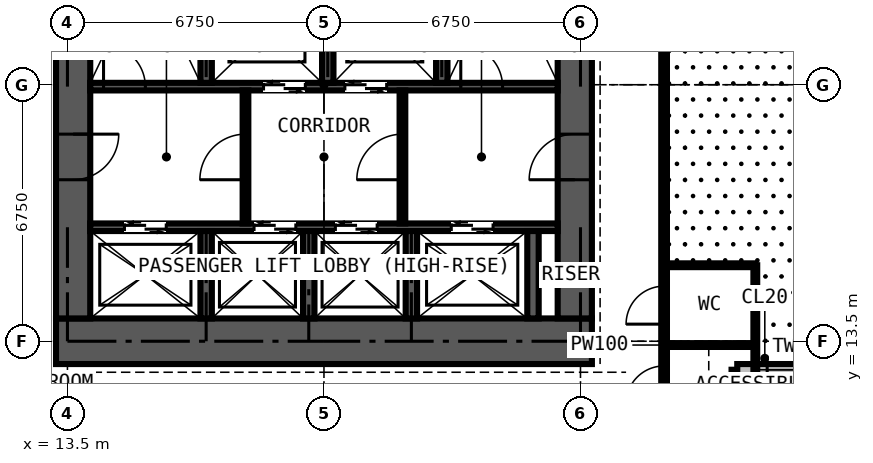
"""IFC4 building model, lengths in metres.
Left out: names, types, materials, properties, quantities, classifications, styles, units other than length and angle.
Written with IfcOpenShell. Run it as: python <this file> out.ifc"""

import sys

from ifc_helpers import new_model, si_unit, direction, frame, frame_2d, origin, place, context, subcontext, project, spatial, rectangle, extrude, element, fill, save


model = new_model("IFC4")
c1 = context("Model", 3, precision=1e-05, world=origin(), true_north=direction((0.0, 1.0)))
c2 = subcontext(c1, "Body", "Model", "MODEL_VIEW")
j1 = project(units=[si_unit("LENGTHUNIT", "METRE"), si_unit("PLANEANGLEUNIT", "RADIAN")], contexts=[c1])
p1 = place(None, origin())
s1 = spatial("IfcSite", under=j1, at=p1, CompositionType="ELEMENT")
p2 = place(p1, origin())
s2 = spatial("IfcBuilding", under=s1, at=p2, CompositionType="ELEMENT")
p3 = place(p2, frame((0.0, 0.0, 251.1)))
s3 = spatial("IfcBuildingStorey", under=s2, at=p3, CompositionType="ELEMENT", Elevation=251.1)
p4 = place(p3, frame((13.2, 13.5, 0.0), z_axis=(0.0, 0.0, 1.0), x_axis=(1.0, 0.0, 0.0)))
e1 = element("IfcWall", 1, at=p4, inside=s3, PredefinedType="SHEAR", context=c2, shape_type="SweptSolid", body=[
    extrude(rectangle(XDim=14.1, YDim=1.2, at=frame_2d((7.05, 0.0))), origin(), (0.0, 0.0, 1.0), 3.6),
])
p5 = place(p3, frame((26.85, 14.1, 0.0), z_axis=(0.0, 0.0, 1.0), x_axis=(0.0, 1.0, 0.0)))
e2 = element("IfcWall", 2, at=p5, inside=s3, PredefinedType="SHEAR", context=c2, shape_type="SweptSolid", body=[
    extrude(rectangle(XDim=12.3, YDim=0.9, at=frame_2d((6.15, 0.0))), origin(), (0.0, 0.0, 1.0), 3.6),
])
p6 = place(p5, frame((3.65, 0.0, 0.0)))
e3 = element("IfcOpeningElement", 3, at=p6, cuts=e2, PredefinedType="OPENING", context=c2, shape_type="SweptSolid", body=[
    extrude(rectangle(XDim=1.2, YDim=2.2, at=frame_2d((0.6, 1.1))), frame((0.0, 0.46, 0.0), z_axis=(0.0, -1.0, 0.0), x_axis=(1.0, 0.0, 0.0)), (0.0, 0.0, 1.0), 0.92),
])
p7 = place(p3, frame((13.65, 26.4, 0.0), z_axis=(0.0, 0.0, 1.0), x_axis=(0.0, -1.0, 0.0)))
e4 = element("IfcWall", 4, at=p7, inside=s3, PredefinedType="SHEAR", context=c2, shape_type="SweptSolid", body=[
    extrude(rectangle(XDim=12.3, YDim=0.9, at=frame_2d((6.15, 0.0))), origin(), (0.0, 0.0, 1.0), 3.6),
])
p8 = place(p7, frame((7.45, 0.0, 0.0)))
e5 = element("IfcOpeningElement", 5, at=p8, cuts=e4, PredefinedType="OPENING", context=c2, shape_type="SweptSolid", body=[
    extrude(rectangle(XDim=1.2, YDim=2.2, at=frame_2d((0.6, 1.1))), frame((0.0, 0.46, 0.0), z_axis=(0.0, -1.0, 0.0), x_axis=(1.0, 0.0, 0.0)), (0.0, 0.0, 1.0), 0.92),
])
p9 = place(p3, frame((31.125, 9.375, 0.0), z_axis=(0.0, 0.0, 1.0), x_axis=(0.0, 1.0, 0.0)))
e6 = element("IfcWall", 6, at=p9, inside=s3, PredefinedType="SOLIDWALL", context=c2, shape_type="SweptSolid", body=[
    extrude(rectangle(XDim=3.375, YDim=0.3, at=frame_2d((1.688, 0.0))), origin(), (0.0, 0.0, 1.0), 3.3),
])
p10 = place(p9, frame((2.2, 0.0, 0.9)))
e7 = element("IfcOpeningElement", 7, at=p10, cuts=e6, PredefinedType="OPENING", context=c2, shape_type="SweptSolid", body=[
    extrude(rectangle(XDim=0.9, YDim=1.8, at=frame_2d((0.45, 0.9))), frame((0.0, 0.16, 0.0), z_axis=(0.0, -1.0, 0.0), x_axis=(1.0, 0.0, 0.0)), (0.0, 0.0, 1.0), 0.32),
])
p11 = place(p3, frame((31.125, 12.75, 0.0), z_axis=(0.0, 0.0, 1.0), x_axis=(1.0, 0.0, 0.0)))
e8 = element("IfcWall", 8, at=p11, inside=s3, PredefinedType="SOLIDWALL", context=c2, shape_type="SweptSolid", body=[
    extrude(rectangle(XDim=3.375, YDim=0.3, at=frame_2d((1.688, 0.0))), origin(), (0.0, 0.0, 1.0), 3.3),
])
p12 = place(p11, frame((0.788, 0.0, 0.6)))
e9 = element("IfcOpeningElement", 9, at=p12, cuts=e8, PredefinedType="OPENING", context=c2, shape_type="SweptSolid", body=[
    extrude(rectangle(XDim=1.8, YDim=2.1, at=frame_2d((0.9, 1.05))), frame((0.0, 0.16, 0.0), z_axis=(0.0, -1.0, 0.0), x_axis=(1.0, 0.0, 0.0)), (0.0, 0.0, 1.0), 0.32),
])
p13 = place(p3, frame((14.1, 16.5, 0.0), z_axis=(0.0, 0.0, 1.0), x_axis=(1.0, 0.0, 0.0)))
e10 = element("IfcWall", 10, at=p13, inside=s3, PredefinedType="SHEAR", context=c2, shape_type="SweptSolid", body=[
    extrude(rectangle(XDim=12.3, YDim=0.2, at=frame_2d((6.15, 0.0))), origin(), (0.0, 0.0, 1.0), 3.6),
])
p14 = place(p13, frame((0.9, 0.0, 0.0)))
e11 = element("IfcOpeningElement", 11, at=p14, cuts=e10, PredefinedType="OPENING", context=c2, shape_type="SweptSolid", body=[
    extrude(rectangle(XDim=1.1, YDim=2.2, at=frame_2d((0.55, 1.1))), frame((0.0, 0.11, 0.0), z_axis=(0.0, -1.0, 0.0), x_axis=(1.0, 0.0, 0.0)), (0.0, 0.0, 1.0), 0.22),
])
p15 = place(p13, frame((4.31, 0.0, 0.0)))
e12 = element("IfcOpeningElement", 12, at=p15, cuts=e10, PredefinedType="OPENING", context=c2, shape_type="SweptSolid", body=[
    extrude(rectangle(XDim=1.1, YDim=2.2, at=frame_2d((0.55, 1.1))), frame((0.0, 0.11, 0.0), z_axis=(0.0, -1.0, 0.0), x_axis=(1.0, 0.0, 0.0)), (0.0, 0.0, 1.0), 0.22),
])
p16 = place(p13, frame((6.45, 0.0, 0.0)))
e13 = element("IfcOpeningElement", 13, at=p16, cuts=e10, PredefinedType="OPENING", context=c2, shape_type="SweptSolid", body=[
    extrude(rectangle(XDim=1.1, YDim=2.2, at=frame_2d((0.55, 1.1))), frame((0.0, 0.11, 0.0), z_axis=(0.0, -1.0, 0.0), x_axis=(1.0, 0.0, 0.0)), (0.0, 0.0, 1.0), 0.22),
])
p17 = place(p13, frame((9.5, 0.0, 0.0)))
e14 = element("IfcOpeningElement", 14, at=p17, cuts=e10, PredefinedType="OPENING", context=c2, shape_type="SweptSolid", body=[
    extrude(rectangle(XDim=1.1, YDim=2.2, at=frame_2d((0.55, 1.1))), frame((0.0, 0.11, 0.0), z_axis=(0.0, -1.0, 0.0), x_axis=(1.0, 0.0, 0.0)), (0.0, 0.0, 1.0), 0.22),
])
p18 = place(p3, frame((14.1, 20.2, 0.0), z_axis=(0.0, 0.0, 1.0), x_axis=(1.0, 0.0, 0.0)))
e15 = element("IfcWall", 15, at=p18, inside=s3, PredefinedType="SHEAR", context=c2, shape_type="SweptSolid", body=[
    extrude(rectangle(XDim=12.3, YDim=0.2, at=frame_2d((6.15, 0.0))), origin(), (0.0, 0.0, 1.0), 3.6),
])
p19 = place(p18, frame((4.56, 0.0, 0.0)))
e16 = element("IfcOpeningElement", 16, at=p19, cuts=e15, PredefinedType="OPENING", context=c2, shape_type="SweptSolid", body=[
    extrude(rectangle(XDim=1.1, YDim=2.2, at=frame_2d((0.55, 1.1))), frame((0.0, 0.11, 0.0), z_axis=(0.0, -1.0, 0.0), x_axis=(1.0, 0.0, 0.0)), (0.0, 0.0, 1.0), 0.22),
])
p20 = place(p18, frame((6.7, 0.0, 0.0)))
e17 = element("IfcOpeningElement", 17, at=p20, cuts=e15, PredefinedType="OPENING", context=c2, shape_type="SweptSolid", body=[
    extrude(rectangle(XDim=1.1, YDim=2.2, at=frame_2d((0.55, 1.1))), frame((0.0, 0.11, 0.0), z_axis=(0.0, -1.0, 0.0), x_axis=(1.0, 0.0, 0.0)), (0.0, 0.0, 1.0), 0.22),
])
p21 = place(p18, frame((0.35, 0.0, 0.0)))
e18 = element("IfcOpeningElement", 18, at=p21, cuts=e15, PredefinedType="OPENING", context=c2, shape_type="SweptSolid", body=[
    extrude(rectangle(XDim=1.1, YDim=2.2, at=frame_2d((0.55, 1.1))), frame((0.0, 0.11, 0.0), z_axis=(0.0, -1.0, 0.0), x_axis=(1.0, 0.0, 0.0)), (0.0, 0.0, 1.0), 0.22),
])
p22 = place(p18, frame((9.75, 0.0, 0.0)))
e19 = element("IfcOpeningElement", 19, at=p22, cuts=e15, PredefinedType="OPENING", context=c2, shape_type="SweptSolid", body=[
    extrude(rectangle(XDim=1.1, YDim=2.2, at=frame_2d((0.55, 1.1))), frame((0.0, 0.11, 0.0), z_axis=(0.0, -1.0, 0.0), x_axis=(1.0, 0.0, 0.0)), (0.0, 0.0, 1.0), 0.22),
])
for number, where, z_axis, x_axis in (
    (20, (17.15, 20.3, 0.0), (0.0, 0.0, 1.0), (0.0, 1.0, 0.0)),
    (21, (23.35, 20.3, 0.0), (0.0, 0.0, 1.0), (0.0, 1.0, 0.0)),
):
    element("IfcWall", number, at=place(p3, frame(where, z_axis=z_axis, x_axis=x_axis)), inside=s3, PredefinedType="SHEAR", context=c2, shape_type="SweptSolid", body=[
        extrude(rectangle(XDim=6.1, YDim=0.3, at=frame_2d((3.05, 0.0))), origin(), (0.0, 0.0, 1.0), 3.6),
    ])
p23 = place(p3, frame((20.35, 20.3, 0.0), z_axis=(0.0, 0.0, 1.0), x_axis=(0.0, 1.0, 0.0)))
e22 = element("IfcWall", 22, at=p23, inside=s3, PredefinedType="SHEAR", context=c2, shape_type="SweptSolid", body=[
    extrude(rectangle(XDim=2.8, YDim=0.3, at=frame_2d((1.4, 0.0))), origin(), (0.0, 0.0, 1.0), 3.6),
])
for number, where, z_axis, x_axis in (
    (23, (17.15, 14.1, 0.0), (0.0, 0.0, 1.0), (0.0, 1.0, 0.0)),
    (24, (19.85, 14.1, 0.0), (0.0, 0.0, 1.0), (0.0, 1.0, 0.0)),
    (25, (22.55, 14.1, 0.0), (0.0, 0.0, 1.0), (0.0, 1.0, 0.0)),
    (26, (25.75, 14.1, 0.0), (0.0, 0.0, 1.0), (0.0, 1.0, 0.0)),
):
    element("IfcWall", number, at=place(p3, frame(where, z_axis=z_axis, x_axis=x_axis)), inside=s3, PredefinedType="SHEAR", context=c2, shape_type="SweptSolid", body=[
        extrude(rectangle(XDim=2.3, YDim=0.3, at=frame_2d((1.15, 0.0))), origin(), (0.0, 0.0, 1.0), 3.6),
    ])
p24 = place(p3, frame((18.185, 16.6, 0.0), z_axis=(0.0, 0.0, 1.0), x_axis=(0.0, 1.0, 0.0)))
e27 = element("IfcWall", 27, at=p24, inside=s3, PredefinedType="PARTITIONING", context=c2, shape_type="SweptSolid", body=[
    extrude(rectangle(XDim=3.5, YDim=0.15, at=frame_2d((1.75, 0.0))), origin(), (0.0, 0.0, 1.0), 3.3),
])
p25 = place(p24, frame((1.15, 0.0, 0.0)))
e28 = element("IfcOpeningElement", 28, at=p25, cuts=e27, PredefinedType="OPENING", context=c2, shape_type="SweptSolid", body=[
    extrude(rectangle(XDim=1.2, YDim=2.2, at=frame_2d((0.6, 1.1))), frame((0.0, 0.085, 0.0), z_axis=(0.0, -1.0, 0.0), x_axis=(1.0, 0.0, 0.0)), (0.0, 0.0, 1.0), 0.17),
])
p26 = place(p3, frame((22.315, 16.6, 0.0), z_axis=(0.0, 0.0, 1.0), x_axis=(0.0, 1.0, 0.0)))
e29 = element("IfcWall", 29, at=p26, inside=s3, PredefinedType="PARTITIONING", context=c2, shape_type="SweptSolid", body=[
    extrude(rectangle(XDim=3.5, YDim=0.15, at=frame_2d((1.75, 0.0))), origin(), (0.0, 0.0, 1.0), 3.3),
])
p27 = place(p26, frame((1.15, 0.0, 0.0)))
e30 = element("IfcOpeningElement", 30, at=p27, cuts=e29, PredefinedType="OPENING", context=c2, shape_type="SweptSolid", body=[
    extrude(rectangle(XDim=1.2, YDim=2.2, at=frame_2d((0.6, 1.1))), frame((0.0, 0.085, 0.0), z_axis=(0.0, -1.0, 0.0), x_axis=(1.0, 0.0, 0.0)), (0.0, 0.0, 1.0), 0.17),
])
p28 = place(p3, frame((29.2, 11.3, 0.0), z_axis=(0.0, 0.0, 1.0), x_axis=(0.0, 1.0, 0.0)))
e31 = element("IfcWall", 31, at=p28, inside=s3, PredefinedType="PARTITIONING", context=c2, shape_type="SweptSolid", body=[
    extrude(rectangle(XDim=19.809, YDim=0.15, at=frame_2d((9.904, 0.0))), origin(), (0.0, 0.0, 1.0), 3.3),
])
p29 = place(p28, frame((0.55, 0.0, 0.0)))
e32 = element("IfcOpeningElement", 32, at=p29, cuts=e31, PredefinedType="OPENING", context=c2, shape_type="SweptSolid", body=[
    extrude(rectangle(XDim=1.0, YDim=2.2, at=frame_2d((0.5, 1.1))), frame((0.0, 0.085, 0.0), z_axis=(0.0, -1.0, 0.0), x_axis=(1.0, 0.0, 0.0)), (0.0, 0.0, 1.0), 0.17),
])
p30 = place(p28, frame((2.65, 0.0, 0.0)))
e33 = element("IfcOpeningElement", 33, at=p30, cuts=e31, PredefinedType="OPENING", context=c2, shape_type="SweptSolid", body=[
    extrude(rectangle(XDim=1.0, YDim=2.2, at=frame_2d((0.5, 1.1))), frame((0.0, 0.085, 0.0), z_axis=(0.0, -1.0, 0.0), x_axis=(1.0, 0.0, 0.0)), (0.0, 0.0, 1.0), 0.17),
])
p31 = place(p28, frame((10.3, 0.0, 0.0)))
e34 = element("IfcOpeningElement", 34, at=p31, cuts=e31, PredefinedType="OPENING", context=c2, shape_type="SweptSolid", body=[
    extrude(rectangle(XDim=1.5, YDim=2.2, at=frame_2d((0.75, 1.1))), frame((0.0, 0.085, 0.0), z_axis=(0.0, -1.0, 0.0), x_axis=(1.0, 0.0, 0.0)), (0.0, 0.0, 1.0), 0.17),
])
p32 = place(p3, frame((29.2, 13.4, 0.0), z_axis=(0.0, 0.0, 1.0), x_axis=(1.0, 0.0, 0.0)))
e35 = element("IfcWall", 35, at=p32, inside=s3, PredefinedType="PARTITIONING", context=c2, shape_type="SweptSolid", body=[
    extrude(rectangle(XDim=2.4, YDim=0.1, at=frame_2d((1.2, 0.0))), origin(), (0.0, 0.0, 1.0), 2.802),
])
p33 = place(p3, frame((29.2, 15.5, 0.0), z_axis=(0.0, 0.0, 1.0), x_axis=(1.0, 0.0, 0.0)))
e36 = element("IfcWall", 36, at=p33, inside=s3, PredefinedType="PARTITIONING", context=c2, shape_type="SweptSolid", body=[
    extrude(rectangle(XDim=2.4, YDim=0.1, at=frame_2d((1.2, 0.0))), origin(), (0.0, 0.0, 1.0), 3.3),
])
p34 = place(p3, frame((31.6, 12.766, 0.0), z_axis=(0.0, 0.0, 1.0), x_axis=(0.0, 1.0, 0.0)))
e37 = element("IfcWall", 37, at=p34, inside=s3, PredefinedType="PARTITIONING", context=c2, shape_type="SweptSolid", body=[
    extrude(rectangle(XDim=2.734, YDim=0.1, at=frame_2d((1.367, 0.0))), origin(), (0.0, 0.0, 1.0), 3.3),
])
p35 = place(p10, origin())
e38 = element("IfcWindow", 38, at=p35, inside=s3, PartitioningType="SINGLE_PANEL", PredefinedType="WINDOW", context=c2, shape_type="SweptSolid", body=[
    extrude(rectangle(XDim=0.9, YDim=1.8, at=frame_2d((0.45, 0.9))), frame((0.0, 0.03, 0.0), z_axis=(0.0, -1.0, 0.0), x_axis=(1.0, 0.0, 0.0)), (0.0, 0.0, 1.0), 0.06),
])
fill(e7, e38)
p36 = place(p12, origin())
e39 = element("IfcWindow", 39, at=p36, inside=s3, PartitioningType="SINGLE_PANEL", PredefinedType="WINDOW", context=c2, shape_type="SweptSolid", body=[
    extrude(rectangle(XDim=1.8, YDim=2.1, at=frame_2d((0.9, 1.05))), frame((0.0, 0.03, 0.0), z_axis=(0.0, -1.0, 0.0), x_axis=(1.0, 0.0, 0.0)), (0.0, 0.0, 1.0), 0.06),
])
fill(e9, e39)
p37 = place(p14, origin())
e40 = element("IfcDoor", 40, at=p37, inside=s3, OperationType="DOUBLE_DOOR_SLIDING", PredefinedType="DOOR", context=c2, shape_type="SweptSolid", body=[
    extrude(rectangle(XDim=1.1, YDim=2.2, at=frame_2d((0.55, 1.1))), frame((0.0, 0.025, 0.0), z_axis=(0.0, -1.0, 0.0), x_axis=(1.0, 0.0, 0.0)), (0.0, 0.0, 1.0), 0.05),
])
fill(e11, e40)
p38 = place(p15, origin())
e41 = element("IfcDoor", 41, at=p38, inside=s3, OperationType="DOUBLE_DOOR_SLIDING", PredefinedType="DOOR", context=c2, shape_type="SweptSolid", body=[
    extrude(rectangle(XDim=1.1, YDim=2.2, at=frame_2d((0.55, 1.1))), frame((0.0, 0.025, 0.0), z_axis=(0.0, -1.0, 0.0), x_axis=(1.0, 0.0, 0.0)), (0.0, 0.0, 1.0), 0.05),
])
fill(e12, e41)
p39 = place(p16, origin())
e42 = element("IfcDoor", 42, at=p39, inside=s3, OperationType="DOUBLE_DOOR_SLIDING", PredefinedType="DOOR", context=c2, shape_type="SweptSolid", body=[
    extrude(rectangle(XDim=1.1, YDim=2.2, at=frame_2d((0.55, 1.1))), frame((0.0, 0.025, 0.0), z_axis=(0.0, -1.0, 0.0), x_axis=(1.0, 0.0, 0.0)), (0.0, 0.0, 1.0), 0.05),
])
fill(e13, e42)
p40 = place(p17, origin())
e43 = element("IfcDoor", 43, at=p40, inside=s3, OperationType="DOUBLE_DOOR_SLIDING", PredefinedType="DOOR", context=c2, shape_type="SweptSolid", body=[
    extrude(rectangle(XDim=1.1, YDim=2.2, at=frame_2d((0.55, 1.1))), frame((0.0, 0.025, 0.0), z_axis=(0.0, -1.0, 0.0), x_axis=(1.0, 0.0, 0.0)), (0.0, 0.0, 1.0), 0.05),
])
fill(e14, e43)
p41 = place(p19, origin())
e44 = element("IfcDoor", 44, at=p41, inside=s3, OperationType="DOUBLE_DOOR_SLIDING", PredefinedType="DOOR", context=c2, shape_type="SweptSolid", body=[
    extrude(rectangle(XDim=1.1, YDim=2.2, at=frame_2d((0.55, 1.1))), frame((0.0, 0.025, 0.0), z_axis=(0.0, -1.0, 0.0), x_axis=(1.0, 0.0, 0.0)), (0.0, 0.0, 1.0), 0.05),
])
fill(e16, e44)
p42 = place(p20, origin())
e45 = element("IfcDoor", 45, at=p42, inside=s3, OperationType="DOUBLE_DOOR_SLIDING", PredefinedType="DOOR", context=c2, shape_type="SweptSolid", body=[
    extrude(rectangle(XDim=1.1, YDim=2.2, at=frame_2d((0.55, 1.1))), frame((0.0, 0.025, 0.0), z_axis=(0.0, -1.0, 0.0), x_axis=(1.0, 0.0, 0.0)), (0.0, 0.0, 1.0), 0.05),
])
fill(e17, e45)
p43 = place(p8, origin())
e46 = element("IfcDoor", 46, at=p43, inside=s3, OperationType="DOUBLE_DOOR_SINGLE_SWING", PredefinedType="DOOR", context=c2, shape_type="SweptSolid", body=[
    extrude(rectangle(XDim=1.2, YDim=2.2, at=frame_2d((0.6, 1.1))), frame((0.0, 0.025, 0.0), z_axis=(0.0, -1.0, 0.0), x_axis=(1.0, 0.0, 0.0)), (0.0, 0.0, 1.0), 0.05),
])
fill(e5, e46)
p44 = place(p6, origin())
e47 = element("IfcDoor", 47, at=p44, inside=s3, OperationType="DOUBLE_DOOR_SINGLE_SWING", PredefinedType="DOOR", context=c2, shape_type="SweptSolid", body=[
    extrude(rectangle(XDim=1.2, YDim=2.2, at=frame_2d((0.6, 1.1))), frame((0.0, 0.025, 0.0), z_axis=(0.0, -1.0, 0.0), x_axis=(1.0, 0.0, 0.0)), (0.0, 0.0, 1.0), 0.05),
])
fill(e3, e47)
p45 = place(p25, origin())
e48 = element("IfcDoor", 48, at=p45, inside=s3, OperationType="DOUBLE_DOOR_SINGLE_SWING", PredefinedType="DOOR", context=c2, shape_type="SweptSolid", body=[
    extrude(rectangle(XDim=1.2, YDim=2.2, at=frame_2d((0.6, 1.1))), frame((0.0, 0.025, 0.0), z_axis=(0.0, -1.0, 0.0), x_axis=(1.0, 0.0, 0.0)), (0.0, 0.0, 1.0), 0.05),
])
fill(e28, e48)
p46 = place(p27, origin())
e49 = element("IfcDoor", 49, at=p46, inside=s3, OperationType="DOUBLE_DOOR_SINGLE_SWING", PredefinedType="DOOR", context=c2, shape_type="SweptSolid", body=[
    extrude(rectangle(XDim=1.2, YDim=2.2, at=frame_2d((0.6, 1.1))), frame((0.0, 0.025, 0.0), z_axis=(0.0, -1.0, 0.0), x_axis=(1.0, 0.0, 0.0)), (0.0, 0.0, 1.0), 0.05),
])
fill(e30, e49)
p47 = place(p21, origin())
e50 = element("IfcDoor", 50, at=p47, inside=s3, OperationType="SINGLE_SWING_LEFT", PredefinedType="DOOR", context=c2, shape_type="SweptSolid", body=[
    extrude(rectangle(XDim=1.1, YDim=2.2, at=frame_2d((0.55, 1.1))), frame((0.0, 0.025, 0.0), z_axis=(0.0, -1.0, 0.0), x_axis=(1.0, 0.0, 0.0)), (0.0, 0.0, 1.0), 0.05),
])
fill(e18, e50)
p48 = place(p22, origin())
e51 = element("IfcDoor", 51, at=p48, inside=s3, OperationType="SINGLE_SWING_LEFT", PredefinedType="DOOR", context=c2, shape_type="SweptSolid", body=[
    extrude(rectangle(XDim=1.1, YDim=2.2, at=frame_2d((0.55, 1.1))), frame((0.0, 0.025, 0.0), z_axis=(0.0, -1.0, 0.0), x_axis=(1.0, 0.0, 0.0)), (0.0, 0.0, 1.0), 0.05),
])
fill(e19, e51)
p49 = place(p29, origin())
e52 = element("IfcDoor", 52, at=p49, inside=s3, OperationType="SINGLE_SWING_LEFT", PredefinedType="DOOR", context=c2, shape_type="SweptSolid", body=[
    extrude(rectangle(XDim=1.0, YDim=2.2, at=frame_2d((0.5, 1.1))), frame((0.0, 0.025, 0.0), z_axis=(0.0, -1.0, 0.0), x_axis=(1.0, 0.0, 0.0)), (0.0, 0.0, 1.0), 0.05),
])
fill(e32, e52)
p50 = place(p30, origin())
e53 = element("IfcDoor", 53, at=p50, inside=s3, OperationType="SINGLE_SWING_LEFT", PredefinedType="DOOR", context=c2, shape_type="SweptSolid", body=[
    extrude(rectangle(XDim=1.0, YDim=2.2, at=frame_2d((0.5, 1.1))), frame((0.0, 0.025, 0.0), z_axis=(0.0, -1.0, 0.0), x_axis=(1.0, 0.0, 0.0)), (0.0, 0.0, 1.0), 0.05),
])
fill(e33, e53)
save(model, sys.argv[1])
